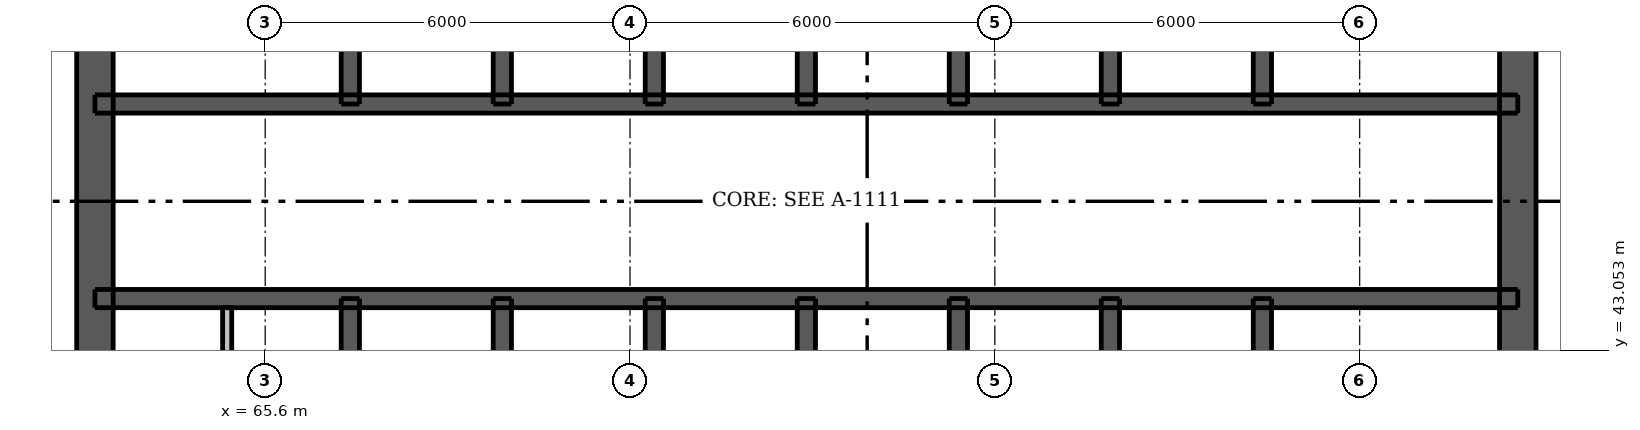
"""IFC4 building model, lengths in metres.
Left out: names, types, materials, properties, quantities, classifications, styles, units other than length and angle.
Written with IfcOpenShell. Run it as: python <this file> out.ifc"""

import sys

from ifc_helpers import new_model, si_unit, direction, frame, frame_2d, origin, place, context, subcontext, project, spatial, rectangle, extrude, element, fill, save


model = new_model("IFC4")
c1 = context("Model", 3, precision=1e-05, world=origin(), true_north=direction((0.0, 1.0)))
c2 = subcontext(c1, "Body", "Model", "MODEL_VIEW")
j1 = project(units=[si_unit("LENGTHUNIT", "METRE"), si_unit("PLANEANGLEUNIT", "RADIAN")], contexts=[c1])
p1 = place(None, origin())
s1 = spatial("IfcSite", under=j1, at=p1, CompositionType="ELEMENT")
p2 = place(p1, origin())
s2 = spatial("IfcBuilding", under=s1, at=p2, CompositionType="ELEMENT")
p3 = place(p2, frame((0.0, 0.0, 210.1)))
s3 = spatial("IfcBuildingStorey", under=s2, at=p3, CompositionType="ELEMENT", Elevation=210.1)
p4 = place(p3, frame((62.8, 33.5, 0.0), z_axis=(0.0, 0.0, 1.0), x_axis=(0.0, 1.0, 0.0)))
e1 = element("IfcWall", 1, at=p4, inside=s3, PredefinedType="SHEAR", context=c2, shape_type="SweptSolid", body=[
    extrude(rectangle(XDim=24.0, YDim=0.6, at=frame_2d((12.0, 0.0))), origin(), (0.0, 0.0, 1.0), 3.05),
])
p5 = place(p4, frame((11.2, 0.0, 0.0)))
e2 = element("IfcOpeningElement", 2, at=p5, cuts=e1, PredefinedType="OPENING", context=c2, shape_type="SweptSolid", body=[
    extrude(rectangle(XDim=1.6, YDim=2.1, at=frame_2d((0.8, 1.05))), frame((0.0, 0.31, 0.0), z_axis=(0.0, -1.0, 0.0), x_axis=(1.0, 0.0, 0.0)), (0.0, 0.0, 1.0), 0.62),
])
p6 = place(p3, frame((86.2, 33.5, 0.0), z_axis=(0.0, 0.0, 1.0), x_axis=(0.0, 1.0, 0.0)))
e3 = element("IfcWall", 3, at=p6, inside=s3, PredefinedType="SHEAR", context=c2, shape_type="SweptSolid", body=[
    extrude(rectangle(XDim=24.0, YDim=0.6, at=frame_2d((12.0, 0.0))), origin(), (0.0, 0.0, 1.0), 3.05),
])
p7 = place(p6, frame((11.2, 0.0, 0.0)))
e4 = element("IfcOpeningElement", 4, at=p7, cuts=e3, PredefinedType="OPENING", context=c2, shape_type="SweptSolid", body=[
    extrude(rectangle(XDim=1.6, YDim=2.1, at=frame_2d((0.8, 1.05))), frame((0.0, 0.31, 0.0), z_axis=(0.0, -1.0, 0.0), x_axis=(1.0, 0.0, 0.0)), (0.0, 0.0, 1.0), 0.62),
])
p8 = place(p3, frame((62.8, 43.9, 0.0), z_axis=(0.0, 0.0, 1.0), x_axis=(1.0, 0.0, 0.0)))
e5 = element("IfcWall", 5, at=p8, inside=s3, PredefinedType="SHEAR", context=c2, shape_type="SweptSolid", body=[
    extrude(rectangle(XDim=23.4, YDim=0.3, at=frame_2d((11.7, 0.0))), origin(), (0.0, 0.0, 1.0), 3.05),
])
p9 = place(p8, frame((0.788, 0.0, 0.0)))
e6 = element("IfcOpeningElement", 6, at=p9, cuts=e5, PredefinedType="OPENING", context=c2, shape_type="SweptSolid", body=[
    extrude(rectangle(XDim=0.9, YDim=2.1, at=frame_2d((0.45, 1.05))), frame((0.0, 0.16, 0.0), z_axis=(0.0, -1.0, 0.0), x_axis=(1.0, 0.0, 0.0)), (0.0, 0.0, 1.0), 0.32),
])
p10 = place(p8, frame((2.663, 0.0, 0.0)))
e7 = element("IfcOpeningElement", 7, at=p10, cuts=e5, PredefinedType="OPENING", context=c2, shape_type="SweptSolid", body=[
    extrude(rectangle(XDim=0.9, YDim=2.1, at=frame_2d((0.45, 1.05))), frame((0.0, 0.16, 0.0), z_axis=(0.0, -1.0, 0.0), x_axis=(1.0, 0.0, 0.0)), (0.0, 0.0, 1.0), 0.32),
])
p11 = place(p8, frame((20.775, 0.0, 0.0)))
e8 = element("IfcOpeningElement", 8, at=p11, cuts=e5, PredefinedType="OPENING", context=c2, shape_type="SweptSolid", body=[
    extrude(rectangle(XDim=0.9, YDim=2.1, at=frame_2d((0.45, 1.05))), frame((0.0, 0.16, 0.0), z_axis=(0.0, -1.0, 0.0), x_axis=(1.0, 0.0, 0.0)), (0.0, 0.0, 1.0), 0.32),
])
p12 = place(p8, frame((5.0, 0.0, 0.0)))
e9 = element("IfcOpeningElement", 9, at=p12, cuts=e5, PredefinedType="OPENING", context=c2, shape_type="SweptSolid", body=[
    extrude(rectangle(XDim=0.9, YDim=2.1, at=frame_2d((0.45, 1.05))), frame((0.0, 0.16, 0.0), z_axis=(0.0, -1.0, 0.0), x_axis=(1.0, 0.0, 0.0)), (0.0, 0.0, 1.0), 0.32),
])
p13 = place(p8, frame((10.0, 0.0, 0.0)))
e10 = element("IfcOpeningElement", 10, at=p13, cuts=e5, PredefinedType="OPENING", context=c2, shape_type="SweptSolid", body=[
    extrude(rectangle(XDim=0.9, YDim=2.1, at=frame_2d((0.45, 1.05))), frame((0.0, 0.16, 0.0), z_axis=(0.0, -1.0, 0.0), x_axis=(1.0, 0.0, 0.0)), (0.0, 0.0, 1.0), 0.32),
])
p14 = place(p8, frame((12.5, 0.0, 0.0)))
e11 = element("IfcOpeningElement", 11, at=p14, cuts=e5, PredefinedType="OPENING", context=c2, shape_type="SweptSolid", body=[
    extrude(rectangle(XDim=0.9, YDim=2.1, at=frame_2d((0.45, 1.05))), frame((0.0, 0.16, 0.0), z_axis=(0.0, -1.0, 0.0), x_axis=(1.0, 0.0, 0.0)), (0.0, 0.0, 1.0), 0.32),
])
p15 = place(p8, frame((17.5, 0.0, 0.0)))
e12 = element("IfcOpeningElement", 12, at=p15, cuts=e5, PredefinedType="OPENING", context=c2, shape_type="SweptSolid", body=[
    extrude(rectangle(XDim=0.9, YDim=2.1, at=frame_2d((0.45, 1.05))), frame((0.0, 0.16, 0.0), z_axis=(0.0, -1.0, 0.0), x_axis=(1.0, 0.0, 0.0)), (0.0, 0.0, 1.0), 0.32),
])
p16 = place(p3, frame((62.8, 47.1, 0.0), z_axis=(0.0, 0.0, 1.0), x_axis=(1.0, 0.0, 0.0)))
e13 = element("IfcWall", 13, at=p16, inside=s3, PredefinedType="SHEAR", context=c2, shape_type="SweptSolid", body=[
    extrude(rectangle(XDim=23.4, YDim=0.3, at=frame_2d((11.7, 0.0))), origin(), (0.0, 0.0, 1.0), 3.05),
])
p17 = place(p16, frame((1.725, 0.0, 0.0)))
e14 = element("IfcOpeningElement", 14, at=p17, cuts=e13, PredefinedType="OPENING", context=c2, shape_type="SweptSolid", body=[
    extrude(rectangle(XDim=0.9, YDim=2.1, at=frame_2d((0.45, 1.05))), frame((0.0, 0.16, 0.0), z_axis=(0.0, -1.0, 0.0), x_axis=(1.0, 0.0, 0.0)), (0.0, 0.0, 1.0), 0.32),
])
p18 = place(p16, frame((20.775, 0.0, 0.0)))
e15 = element("IfcOpeningElement", 15, at=p18, cuts=e13, PredefinedType="OPENING", context=c2, shape_type="SweptSolid", body=[
    extrude(rectangle(XDim=0.9, YDim=2.1, at=frame_2d((0.45, 1.05))), frame((0.0, 0.16, 0.0), z_axis=(0.0, -1.0, 0.0), x_axis=(1.0, 0.0, 0.0)), (0.0, 0.0, 1.0), 0.32),
])
p19 = place(p16, frame((4.9, 0.0, 0.0)))
e16 = element("IfcOpeningElement", 16, at=p19, cuts=e13, PredefinedType="OPENING", context=c2, shape_type="SweptSolid", body=[
    extrude(rectangle(XDim=1.1, YDim=2.1, at=frame_2d((0.55, 1.05))), frame((0.0, 0.16, 0.0), z_axis=(0.0, -1.0, 0.0), x_axis=(1.0, 0.0, 0.0)), (0.0, 0.0, 1.0), 0.32),
])
p20 = place(p16, frame((7.4, 0.0, 0.0)))
e17 = element("IfcOpeningElement", 17, at=p20, cuts=e13, PredefinedType="OPENING", context=c2, shape_type="SweptSolid", body=[
    extrude(rectangle(XDim=1.1, YDim=2.1, at=frame_2d((0.55, 1.05))), frame((0.0, 0.16, 0.0), z_axis=(0.0, -1.0, 0.0), x_axis=(1.0, 0.0, 0.0)), (0.0, 0.0, 1.0), 0.32),
])
p21 = place(p16, frame((9.9, 0.0, 0.0)))
e18 = element("IfcOpeningElement", 18, at=p21, cuts=e13, PredefinedType="OPENING", context=c2, shape_type="SweptSolid", body=[
    extrude(rectangle(XDim=1.1, YDim=2.1, at=frame_2d((0.55, 1.05))), frame((0.0, 0.16, 0.0), z_axis=(0.0, -1.0, 0.0), x_axis=(1.0, 0.0, 0.0)), (0.0, 0.0, 1.0), 0.32),
])
p22 = place(p16, frame((12.4, 0.0, 0.0)))
e19 = element("IfcOpeningElement", 19, at=p22, cuts=e13, PredefinedType="OPENING", context=c2, shape_type="SweptSolid", body=[
    extrude(rectangle(XDim=1.1, YDim=2.1, at=frame_2d((0.55, 1.05))), frame((0.0, 0.16, 0.0), z_axis=(0.0, -1.0, 0.0), x_axis=(1.0, 0.0, 0.0)), (0.0, 0.0, 1.0), 0.32),
])
p23 = place(p16, frame((14.9, 0.0, 0.0)))
e20 = element("IfcOpeningElement", 20, at=p23, cuts=e13, PredefinedType="OPENING", context=c2, shape_type="SweptSolid", body=[
    extrude(rectangle(XDim=1.1, YDim=2.1, at=frame_2d((0.55, 1.05))), frame((0.0, 0.16, 0.0), z_axis=(0.0, -1.0, 0.0), x_axis=(1.0, 0.0, 0.0)), (0.0, 0.0, 1.0), 0.32),
])
p24 = place(p16, frame((17.4, 0.0, 0.0)))
e21 = element("IfcOpeningElement", 21, at=p24, cuts=e13, PredefinedType="OPENING", context=c2, shape_type="SweptSolid", body=[
    extrude(rectangle(XDim=1.1, YDim=2.1, at=frame_2d((0.55, 1.05))), frame((0.0, 0.16, 0.0), z_axis=(0.0, -1.0, 0.0), x_axis=(1.0, 0.0, 0.0)), (0.0, 0.0, 1.0), 0.32),
])
p25 = place(p3, frame((67.0, 33.8, 0.0), z_axis=(0.0, 0.0, 1.0), x_axis=(0.0, 1.0, 0.0)))
e22 = element("IfcWall", 22, at=p25, inside=s3, PredefinedType="SHEAR", context=c2, shape_type="SweptSolid", body=[
    extrude(rectangle(XDim=10.1, YDim=0.3, at=frame_2d((5.05, 0.0))), origin(), (0.0, 0.0, 1.0), 3.05),
])
p26 = place(p25, frame((0.5, 0.0, 0.0)))
e23 = element("IfcOpeningElement", 23, at=p26, cuts=e22, PredefinedType="OPENING", context=c2, shape_type="SweptSolid", body=[
    extrude(rectangle(XDim=1.1, YDim=2.1, at=frame_2d((0.55, 1.05))), frame((0.0, 0.16, 0.0), z_axis=(0.0, -1.0, 0.0), x_axis=(1.0, 0.0, 0.0)), (0.0, 0.0, 1.0), 0.32),
])
for number, where, z_axis, x_axis in (
    (24, (67.0, 47.1, 0.0), (0.0, 0.0, 1.0), (0.0, 1.0, 0.0)),
    (25, (82.0, 33.8, 0.0), (0.0, 0.0, 1.0), (0.0, 1.0, 0.0)),
    (26, (82.0, 47.1, 0.0), (0.0, 0.0, 1.0), (0.0, 1.0, 0.0)),
):
    element("IfcWall", number, at=place(p3, frame(where, z_axis=z_axis, x_axis=x_axis)), inside=s3, PredefinedType="SHEAR", context=c2, shape_type="SweptSolid", body=[
        extrude(rectangle(XDim=10.1, YDim=0.3, at=frame_2d((5.05, 0.0))), origin(), (0.0, 0.0, 1.0), 3.05),
    ])
for number, where, z_axis, x_axis in (
    (27, (69.5, 41.0, 0.0), (0.0, 0.0, 1.0), (0.0, 1.0, 0.0)),
    (28, (69.5, 47.1, 0.0), (0.0, 0.0, 1.0), (0.0, 1.0, 0.0)),
    (29, (72.0, 41.0, 0.0), (0.0, 0.0, 1.0), (0.0, 1.0, 0.0)),
    (30, (72.0, 47.1, 0.0), (0.0, 0.0, 1.0), (0.0, 1.0, 0.0)),
    (31, (74.5, 41.0, 0.0), (0.0, 0.0, 1.0), (0.0, 1.0, 0.0)),
    (32, (74.5, 47.1, 0.0), (0.0, 0.0, 1.0), (0.0, 1.0, 0.0)),
    (33, (77.0, 41.0, 0.0), (0.0, 0.0, 1.0), (0.0, 1.0, 0.0)),
    (34, (77.0, 47.1, 0.0), (0.0, 0.0, 1.0), (0.0, 1.0, 0.0)),
    (35, (79.5, 41.0, 0.0), (0.0, 0.0, 1.0), (0.0, 1.0, 0.0)),
    (36, (79.5, 47.1, 0.0), (0.0, 0.0, 1.0), (0.0, 1.0, 0.0)),
):
    element("IfcWall", number, at=place(p3, frame(where, z_axis=z_axis, x_axis=x_axis)), inside=s3, PredefinedType="SHEAR", context=c2, shape_type="SweptSolid", body=[
        extrude(rectangle(XDim=2.9, YDim=0.3, at=frame_2d((1.45, 0.0))), origin(), (0.0, 0.0, 1.0), 3.05),
    ])
p27 = place(p3, frame((64.975, 41.15, 0.0), z_axis=(0.0, 0.0, 1.0), x_axis=(0.0, 1.0, 0.0)))
e37 = element("IfcWall", 37, at=p27, inside=s3, PredefinedType="PLUMBINGWALL", context=c2, shape_type="SweptSolid", body=[
    extrude(rectangle(XDim=2.6, YDim=0.15, at=frame_2d((1.3, 0.0))), origin(), (0.0, 0.0, 1.0), 3.05),
])
p28 = place(p5, origin())
e38 = element("IfcDoor", 38, at=p28, inside=s3, OperationType="DOUBLE_DOOR_SINGLE_SWING", PredefinedType="DOOR", context=c2, shape_type="SweptSolid", body=[
    extrude(rectangle(XDim=1.6, YDim=2.1, at=frame_2d((0.8, 1.05))), frame((0.0, -0.237, 0.0), z_axis=(0.0, -1.0, 0.0), x_axis=(1.0, 0.0, 0.0)), (0.0, 0.0, 1.0), 0.05),
])
fill(e2, e38)
p29 = place(p7, origin())
e39 = element("IfcDoor", 39, at=p29, inside=s3, OperationType="DOUBLE_DOOR_SINGLE_SWING", PredefinedType="DOOR", context=c2, shape_type="SweptSolid", body=[
    extrude(rectangle(XDim=1.6, YDim=2.1, at=frame_2d((0.8, 1.05))), frame((0.0, 0.288, 0.0), z_axis=(0.0, -1.0, 0.0), x_axis=(1.0, 0.0, 0.0)), (0.0, 0.0, 1.0), 0.05),
])
fill(e4, e39)
p30 = place(p9, origin())
e40 = element("IfcDoor", 40, at=p30, inside=s3, OperationType="SINGLE_SWING_LEFT", PredefinedType="DOOR", context=c2, shape_type="SweptSolid", body=[
    extrude(rectangle(XDim=0.9, YDim=2.1, at=frame_2d((0.45, 1.05))), frame((0.0, -0.087, 0.0), z_axis=(0.0, -1.0, 0.0), x_axis=(1.0, 0.0, 0.0)), (0.0, 0.0, 1.0), 0.05),
])
fill(e6, e40)
p31 = place(p10, origin())
e41 = element("IfcDoor", 41, at=p31, inside=s3, OperationType="SINGLE_SWING_RIGHT", PredefinedType="DOOR", context=c2, shape_type="SweptSolid", body=[
    extrude(rectangle(XDim=0.9, YDim=2.1, at=frame_2d((0.45, 1.05))), frame((0.0, -0.087, 0.0), z_axis=(0.0, -1.0, 0.0), x_axis=(1.0, 0.0, 0.0)), (0.0, 0.0, 1.0), 0.05),
])
fill(e7, e41)
p32 = place(p11, origin())
e42 = element("IfcDoor", 42, at=p32, inside=s3, OperationType="SINGLE_SWING_LEFT", PredefinedType="DOOR", context=c2, shape_type="SweptSolid", body=[
    extrude(rectangle(XDim=0.9, YDim=2.1, at=frame_2d((0.45, 1.05))), frame((0.0, -0.087, 0.0), z_axis=(0.0, -1.0, 0.0), x_axis=(1.0, 0.0, 0.0)), (0.0, 0.0, 1.0), 0.05),
])
fill(e8, e42)
p33 = place(p17, origin())
e43 = element("IfcDoor", 43, at=p33, inside=s3, OperationType="SINGLE_SWING_LEFT", PredefinedType="DOOR", context=c2, shape_type="SweptSolid", body=[
    extrude(rectangle(XDim=0.9, YDim=2.1, at=frame_2d((0.45, 1.05))), frame((0.0, 0.138, 0.0), z_axis=(0.0, -1.0, 0.0), x_axis=(1.0, 0.0, 0.0)), (0.0, 0.0, 1.0), 0.05),
])
fill(e14, e43)
p34 = place(p18, origin())
e44 = element("IfcDoor", 44, at=p34, inside=s3, OperationType="SINGLE_SWING_LEFT", PredefinedType="DOOR", context=c2, shape_type="SweptSolid", body=[
    extrude(rectangle(XDim=0.9, YDim=2.1, at=frame_2d((0.45, 1.05))), frame((0.0, 0.138, 0.0), z_axis=(0.0, -1.0, 0.0), x_axis=(1.0, 0.0, 0.0)), (0.0, 0.0, 1.0), 0.05),
])
fill(e15, e44)
p35 = place(p12, origin())
e45 = element("IfcDoor", 45, at=p35, inside=s3, OperationType="SINGLE_SWING_RIGHT", PredefinedType="DOOR", context=c2, shape_type="SweptSolid", body=[
    extrude(rectangle(XDim=0.9, YDim=2.1, at=frame_2d((0.45, 1.05))), frame((0.0, -0.087, 0.0), z_axis=(0.0, -1.0, 0.0), x_axis=(1.0, 0.0, 0.0)), (0.0, 0.0, 1.0), 0.05),
])
fill(e9, e45)
p36 = place(p13, origin())
e46 = element("IfcDoor", 46, at=p36, inside=s3, OperationType="SINGLE_SWING_RIGHT", PredefinedType="DOOR", context=c2, shape_type="SweptSolid", body=[
    extrude(rectangle(XDim=0.9, YDim=2.1, at=frame_2d((0.45, 1.05))), frame((0.0, -0.087, 0.0), z_axis=(0.0, -1.0, 0.0), x_axis=(1.0, 0.0, 0.0)), (0.0, 0.0, 1.0), 0.05),
])
fill(e10, e46)
p37 = place(p14, origin())
e47 = element("IfcDoor", 47, at=p37, inside=s3, OperationType="SINGLE_SWING_LEFT", PredefinedType="DOOR", context=c2, shape_type="SweptSolid", body=[
    extrude(rectangle(XDim=0.9, YDim=2.1, at=frame_2d((0.45, 1.05))), frame((0.0, -0.087, 0.0), z_axis=(0.0, -1.0, 0.0), x_axis=(1.0, 0.0, 0.0)), (0.0, 0.0, 1.0), 0.05),
])
fill(e11, e47)
p38 = place(p15, origin())
e48 = element("IfcDoor", 48, at=p38, inside=s3, OperationType="SINGLE_SWING_LEFT", PredefinedType="DOOR", context=c2, shape_type="SweptSolid", body=[
    extrude(rectangle(XDim=0.9, YDim=2.1, at=frame_2d((0.45, 1.05))), frame((0.0, -0.087, 0.0), z_axis=(0.0, -1.0, 0.0), x_axis=(1.0, 0.0, 0.0)), (0.0, 0.0, 1.0), 0.05),
])
fill(e12, e48)
p39 = place(p19, origin())
e49 = element("IfcDoor", 49, at=p39, inside=s3, OperationType="DOUBLE_DOOR_SLIDING", PredefinedType="DOOR", context=c2, shape_type="SweptSolid", body=[
    extrude(rectangle(XDim=1.1, YDim=2.1, at=frame_2d((0.55, 1.05))), frame((0.0, 0.025, 0.0), z_axis=(0.0, -1.0, 0.0), x_axis=(1.0, 0.0, 0.0)), (0.0, 0.0, 1.0), 0.05),
])
fill(e16, e49)
p40 = place(p20, origin())
e50 = element("IfcDoor", 50, at=p40, inside=s3, OperationType="DOUBLE_DOOR_SLIDING", PredefinedType="DOOR", context=c2, shape_type="SweptSolid", body=[
    extrude(rectangle(XDim=1.1, YDim=2.1, at=frame_2d((0.55, 1.05))), frame((0.0, 0.025, 0.0), z_axis=(0.0, -1.0, 0.0), x_axis=(1.0, 0.0, 0.0)), (0.0, 0.0, 1.0), 0.05),
])
fill(e17, e50)
p41 = place(p21, origin())
e51 = element("IfcDoor", 51, at=p41, inside=s3, OperationType="DOUBLE_DOOR_SLIDING", PredefinedType="DOOR", context=c2, shape_type="SweptSolid", body=[
    extrude(rectangle(XDim=1.1, YDim=2.1, at=frame_2d((0.55, 1.05))), frame((0.0, 0.025, 0.0), z_axis=(0.0, -1.0, 0.0), x_axis=(1.0, 0.0, 0.0)), (0.0, 0.0, 1.0), 0.05),
])
fill(e18, e51)
p42 = place(p22, origin())
e52 = element("IfcDoor", 52, at=p42, inside=s3, OperationType="DOUBLE_DOOR_SLIDING", PredefinedType="DOOR", context=c2, shape_type="SweptSolid", body=[
    extrude(rectangle(XDim=1.1, YDim=2.1, at=frame_2d((0.55, 1.05))), frame((0.0, 0.025, 0.0), z_axis=(0.0, -1.0, 0.0), x_axis=(1.0, 0.0, 0.0)), (0.0, 0.0, 1.0), 0.05),
])
fill(e19, e52)
p43 = place(p23, origin())
e53 = element("IfcDoor", 53, at=p43, inside=s3, OperationType="DOUBLE_DOOR_SLIDING", PredefinedType="DOOR", context=c2, shape_type="SweptSolid", body=[
    extrude(rectangle(XDim=1.1, YDim=2.1, at=frame_2d((0.55, 1.05))), frame((0.0, 0.025, 0.0), z_axis=(0.0, -1.0, 0.0), x_axis=(1.0, 0.0, 0.0)), (0.0, 0.0, 1.0), 0.05),
])
fill(e20, e53)
p44 = place(p24, origin())
e54 = element("IfcDoor", 54, at=p44, inside=s3, OperationType="DOUBLE_DOOR_SLIDING", PredefinedType="DOOR", context=c2, shape_type="SweptSolid", body=[
    extrude(rectangle(XDim=1.1, YDim=2.1, at=frame_2d((0.55, 1.05))), frame((0.0, 0.025, 0.0), z_axis=(0.0, -1.0, 0.0), x_axis=(1.0, 0.0, 0.0)), (0.0, 0.0, 1.0), 0.05),
])
fill(e21, e54)
save(model, sys.argv[1])
